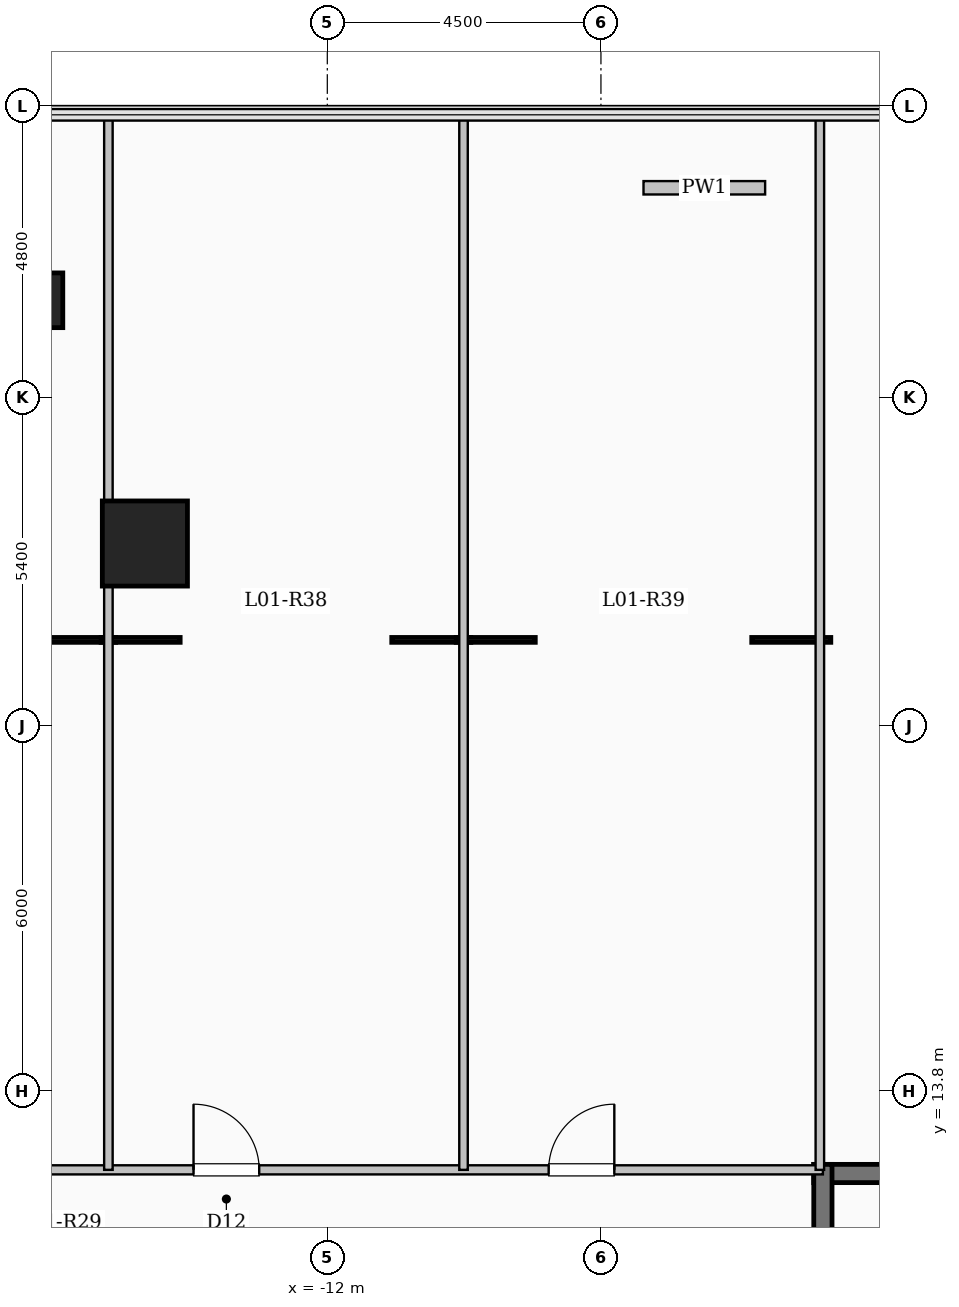
"""IFC4 building model, lengths in metres.
Left out: names, types, materials, properties, quantities, classifications, styles, units other than length and angle.
Written with IfcOpenShell. Run it as: python <this file> out.ifc"""

import sys

from ifc_helpers import new_model, si_unit, direction, frame, frame_2d, origin, origin_2d, place, context, subcontext, project, spatial, rectangle, extrude, element, fill, save


model = new_model("IFC4")
c1 = context("Model", 3, precision=1e-05, world=origin(), true_north=direction((0.0, 1.0)))
c2 = subcontext(c1, "Body", "Model", "MODEL_VIEW")
j1 = project(units=[si_unit("LENGTHUNIT", "METRE"), si_unit("PLANEANGLEUNIT", "RADIAN")], contexts=[c1])
p1 = place(None, origin())
s1 = spatial("IfcSite", under=j1, at=p1, CompositionType="ELEMENT")
p2 = place(p1, origin())
s2 = spatial("IfcBuilding", under=s1, at=p2, CompositionType="ELEMENT")
p3 = place(p2, frame((0.0, 0.0, 5.4)))
s3 = spatial("IfcBuildingStorey", under=s2, at=p3, CompositionType="ELEMENT", Elevation=5.4)
p4 = place(p3, frame((-16.8, 26.8, 0.0), z_axis=(0.0, 0.0, 1.0), x_axis=(1.0, 0.0, 0.0)))
e1 = element("IfcColumn", 1, at=p4, inside=s3, PredefinedType="COLUMN", context=c2, shape_type="SweptSolid", body=[
    extrude(rectangle(XDim=0.9, YDim=0.9, at=origin_2d()), origin(), (0.0, 0.0, 1.0), 4.5),
])
p5 = place(p3, frame((-15.0, 22.8, 0.0), z_axis=(0.0, 0.0, 1.0), x_axis=(1.0, 0.0, 0.0)))
e2 = element("IfcColumn", 2, at=p5, inside=s3, PredefinedType="COLUMN", context=c2, shape_type="SweptSolid", body=[
    extrude(rectangle(XDim=1.4, YDim=1.4, at=origin_2d()), origin(), (0.0, 0.0, 1.0), 4.5),
])
p6 = place(p3, frame((-6.8, 28.65, 0.0), z_axis=(0.0, 0.0, 1.0), x_axis=(1.0, 0.0, 0.0)))
e3 = element("IfcWall", 3, at=p6, inside=s3, PredefinedType="PARAPET", context=c2, shape_type="SweptSolid", body=[
    extrude(rectangle(XDim=2.0, YDim=0.22, at=frame_2d((1.0, 0.0))), origin(), (0.0, 0.0, 1.0), 0.85),
])
p7 = place(p3, frame((-4.0, 12.44, 0.0), z_axis=(0.0, 0.0, 1.0), x_axis=(1.0, 0.0, 0.0)))
e4 = element("IfcWall", 4, at=p7, inside=s3, PredefinedType="SHEAR", context=c2, shape_type="SweptSolid", body=[
    extrude(rectangle(XDim=8.0, YDim=0.3, at=frame_2d((4.0, 0.0))), origin(), (0.0, 0.0, 1.0), 4.5),
])
p8 = place(p3, frame((-3.85, 9.0, 0.0), z_axis=(0.0, 0.0, 1.0), x_axis=(0.0, 1.0, 0.0)))
e5 = element("IfcWall", 5, at=p8, inside=s3, PredefinedType="SHEAR", context=c2, shape_type="SweptSolid", body=[
    extrude(rectangle(XDim=3.59, YDim=0.3, at=frame_2d((1.795, 0.0))), origin(), (0.0, 0.0, 1.0), 4.5),
])
p9 = place(p3, frame((-28.88, 12.5, 0.0), z_axis=(0.0, 0.0, 1.0), x_axis=(1.0, 0.0, 0.0)))
e6 = element("IfcWall", 6, at=p9, inside=s3, PredefinedType="PARTITIONING", context=c2, shape_type="SweptSolid", body=[
    extrude(rectangle(XDim=25.03, YDim=0.15, at=frame_2d((12.515, 0.0))), origin(), (0.0, 0.0, 1.0), 4.2),
])
p10 = place(p9, frame((2.65, 0.0, 0.0)))
e7 = element("IfcOpeningElement", 7, at=p10, cuts=e6, PredefinedType="OPENING", context=c2, shape_type="SweptSolid", body=[
    extrude(rectangle(XDim=1.2, YDim=2.15, at=frame_2d((0.6, 1.075))), frame((0.0, 0.085, 0.0), z_axis=(0.0, -1.0, 0.0), x_axis=(1.0, 0.0, 0.0)), (0.0, 0.0, 1.0), 0.17),
])
p11 = place(p9, frame((14.68, 0.0, 0.0)))
e8 = element("IfcOpeningElement", 8, at=p11, cuts=e6, PredefinedType="OPENING", context=c2, shape_type="SweptSolid", body=[
    extrude(rectangle(XDim=1.08, YDim=2.15, at=frame_2d((0.54, 1.075))), frame((0.0, 0.085, 0.0), z_axis=(0.0, -1.0, 0.0), x_axis=(1.0, 0.0, 0.0)), (0.0, 0.0, 1.0), 0.17),
])
p12 = place(p9, frame((20.52, 0.0, 0.0)))
e9 = element("IfcOpeningElement", 9, at=p12, cuts=e6, PredefinedType="OPENING", context=c2, shape_type="SweptSolid", body=[
    extrude(rectangle(XDim=1.08, YDim=2.15, at=frame_2d((0.54, 1.075))), frame((0.0, 0.085, 0.0), z_axis=(0.0, -1.0, 0.0), x_axis=(1.0, 0.0, 0.0)), (0.0, 0.0, 1.0), 0.17),
])
p13 = place(p3, frame((-3.9, 12.5, 0.0), z_axis=(0.0, 0.0, 1.0), x_axis=(0.0, 1.0, 0.0)))
e10 = element("IfcWall", 10, at=p13, inside=s3, PredefinedType="PARTITIONING", context=c2, shape_type="SweptSolid", body=[
    extrude(rectangle(XDim=17.38, YDim=0.14, at=frame_2d((8.69, 0.0))), origin(), (0.0, 0.0, 1.0), 4.2),
])
p14 = place(p3, frame((-15.6, 12.5, 0.0), z_axis=(0.0, 0.0, 1.0), x_axis=(0.0, 1.0, 0.0)))
e11 = element("IfcWall", 11, at=p14, inside=s3, PredefinedType="PARTITIONING", context=c2, shape_type="SweptSolid", body=[
    extrude(rectangle(XDim=17.38, YDim=0.14, at=frame_2d((8.69, 0.0))), origin(), (0.0, 0.0, 1.0), 3.385),
])
p15 = place(p3, frame((-9.76, 12.5, 0.0), z_axis=(0.0, 0.0, 1.0), x_axis=(0.0, 1.0, 0.0)))
e12 = element("IfcWall", 12, at=p15, inside=s3, PredefinedType="PARTITIONING", context=c2, shape_type="SweptSolid", body=[
    extrude(rectangle(XDim=17.38, YDim=0.14, at=frame_2d((8.69, 0.0))), origin(), (0.0, 0.0, 1.0), 4.2),
])
p16 = place(p11, origin())
e13 = element("IfcDoor", 13, at=p16, inside=s3, OperationType="SINGLE_SWING_LEFT", PredefinedType="DOOR", context=c2, shape_type="SweptSolid", body=[
    extrude(rectangle(XDim=1.08, YDim=2.15, at=frame_2d((0.54, 1.075))), frame((0.0, 0.025, 0.0), z_axis=(0.0, -1.0, 0.0), x_axis=(1.0, 0.0, 0.0)), (0.0, 0.0, 1.0), 0.05),
])
fill(e8, e13)
p17 = place(p12, origin())
e14 = element("IfcDoor", 14, at=p17, inside=s3, OperationType="SINGLE_SWING_RIGHT", PredefinedType="DOOR", context=c2, shape_type="SweptSolid", body=[
    extrude(rectangle(XDim=1.08, YDim=2.15, at=frame_2d((0.54, 1.075))), frame((0.0, 0.025, 0.0), z_axis=(0.0, -1.0, 0.0), x_axis=(1.0, 0.0, 0.0)), (0.0, 0.0, 1.0), 0.05),
])
fill(e9, e14)
save(model, sys.argv[1])
